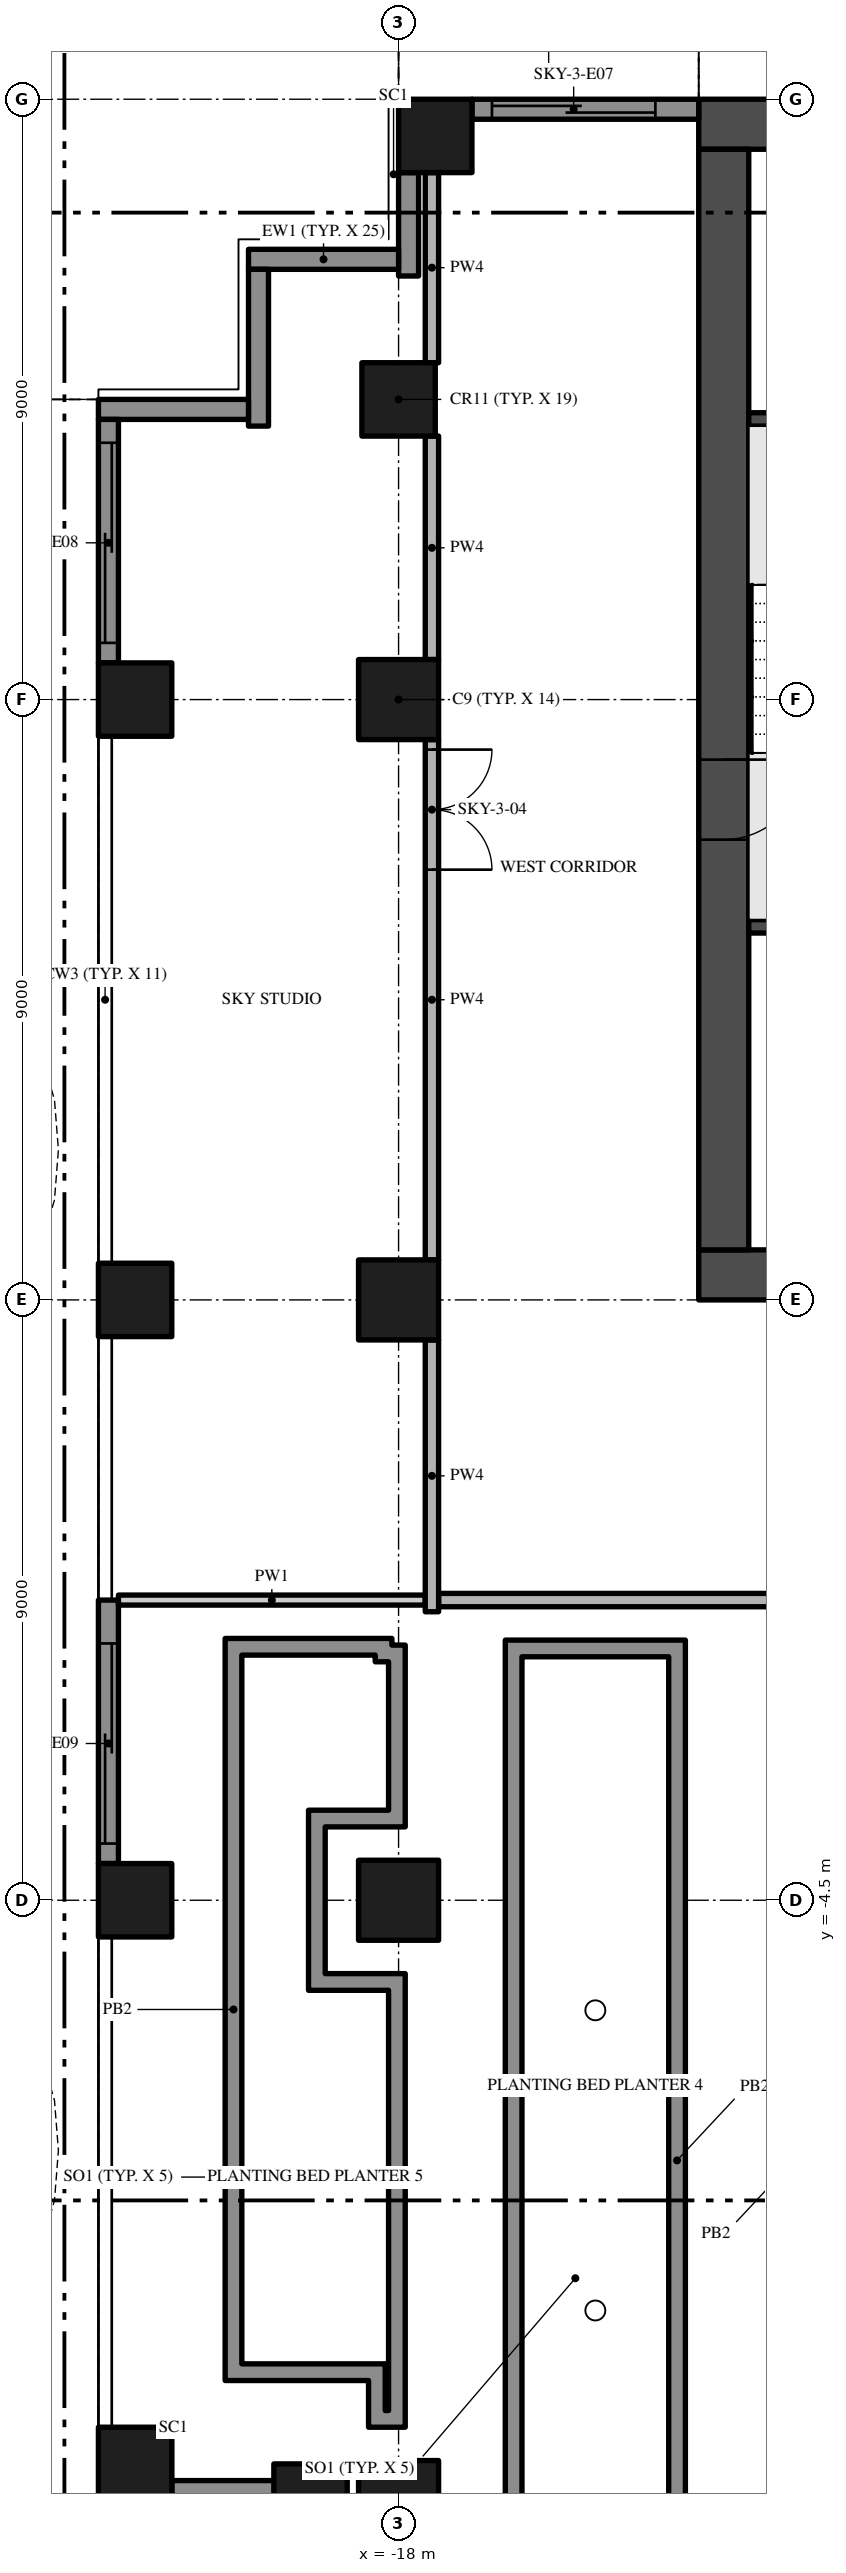
"""IFC4 building model, lengths in metres.
Left out: names, types, materials, properties, quantities, classifications, styles, units other than length and angle.
Written with IfcOpenShell. Run it as: python <this file> out.ifc"""

import sys

from ifc_helpers import new_model, si_unit, direction, frame, frame_2d, origin, origin_2d, place, context, subcontext, project, spatial, polyline, rectangle, outline, extrude, element, fill, save


model = new_model("IFC4")
c1 = context("Model", 3, precision=1e-05, world=origin(), true_north=direction((0.0, 1.0)))
c2 = subcontext(c1, "Body", "Model", "MODEL_VIEW")
j1 = project(units=[si_unit("LENGTHUNIT", "METRE"), si_unit("PLANEANGLEUNIT", "RADIAN")], contexts=[c1])
p1 = place(None, origin())
s1 = spatial("IfcSite", under=j1, at=p1, CompositionType="ELEMENT")
p2 = place(p1, origin())
s2 = spatial("IfcBuilding", under=s1, at=p2, CompositionType="ELEMENT")
p3 = place(p2, frame((0.0, 0.0, 174.4)))
s3 = spatial("IfcBuildingStorey", under=s2, at=p3, CompositionType="ELEMENT", Elevation=174.4)
p4 = place(p3, frame((-13.5, 4.875, -0.3), z_axis=(0.0, 0.0, 1.0), x_axis=(1.0, 0.0, 0.0)))
e1 = element("IfcWall", 1, at=p4, inside=s3, PredefinedType="SHEAR", context=c2, shape_type="SweptSolid", body=[
    extrude(rectangle(XDim=27.0, YDim=0.75, at=frame_2d((13.5, 0.0))), origin(), (0.0, 0.0, 1.0), 5.0),
])
p5 = place(p4, frame((12.0, 0.0, 0.3)))
e2 = element("IfcOpeningElement", 2, at=p5, cuts=e1, PredefinedType="OPENING", context=c2, shape_type="SweptSolid", body=[
    extrude(rectangle(XDim=3.0, YDim=2.4, at=frame_2d((1.5, 1.2))), frame((0.0, 0.385, 0.0), z_axis=(0.0, -1.0, 0.0), x_axis=(1.0, 0.0, 0.0)), (0.0, 0.0, 1.0), 0.77),
])
p6 = place(p4, frame((4.9, 0.0, 0.3)))
e3 = element("IfcOpeningElement", 3, at=p6, cuts=e1, PredefinedType="OPENING", context=c2, shape_type="SweptSolid", body=[
    extrude(rectangle(XDim=1.2, YDim=2.2, at=frame_2d((0.6, 1.1))), frame((0.0, 0.385, 0.0), z_axis=(0.0, -1.0, 0.0), x_axis=(1.0, 0.0, 0.0)), (0.0, 0.0, 1.0), 0.77),
])
p7 = place(p4, frame((20.75, 0.0, 0.3)))
e4 = element("IfcOpeningElement", 4, at=p7, cuts=e1, PredefinedType="OPENING", context=c2, shape_type="SweptSolid", body=[
    extrude(rectangle(XDim=1.5, YDim=2.2, at=frame_2d((0.75, 1.1))), frame((0.0, 0.385, 0.0), z_axis=(0.0, -1.0, 0.0), x_axis=(1.0, 0.0, 0.0)), (0.0, 0.0, 1.0), 0.77),
])
p8 = place(p4, frame((17.4, 0.0, 0.3)))
e5 = element("IfcOpeningElement", 5, at=p8, cuts=e1, PredefinedType="OPENING", context=c2, shape_type="SweptSolid", body=[
    extrude(rectangle(XDim=1.2, YDim=2.2, at=frame_2d((0.6, 1.1))), frame((0.0, 0.385, 0.0), z_axis=(0.0, -1.0, 0.0), x_axis=(1.0, 0.0, 0.0)), (0.0, 0.0, 1.0), 0.77),
])
p9 = place(p3, frame((13.5, 22.125, -0.3), z_axis=(0.0, 0.0, 1.0), x_axis=(-1.0, 0.0, 0.0)))
e6 = element("IfcWall", 6, at=p9, inside=s3, PredefinedType="SHEAR", context=c2, shape_type="SweptSolid", body=[
    extrude(rectangle(XDim=27.0, YDim=0.75, at=frame_2d((13.5, 0.0))), origin(), (0.0, 0.0, 1.0), 5.0),
])
p10 = place(p3, frame((-13.125, 21.75, -0.3), z_axis=(0.0, 0.0, 1.0), x_axis=(0.0, -1.0, 0.0)))
e7 = element("IfcWall", 7, at=p10, inside=s3, PredefinedType="SHEAR", context=c2, shape_type="SweptSolid", body=[
    extrude(rectangle(XDim=16.5, YDim=0.75, at=frame_2d((8.25, 0.0))), origin(), (0.0, 0.0, 1.0), 5.0),
])
p11 = place(p10, frame((9.15, 0.0, 0.3)))
e8 = element("IfcOpeningElement", 8, at=p11, cuts=e7, PredefinedType="OPENING", context=c2, shape_type="SweptSolid", body=[
    extrude(rectangle(XDim=1.2, YDim=2.2, at=frame_2d((0.6, 1.1))), frame((0.0, 0.385, 0.0), z_axis=(0.0, -1.0, 0.0), x_axis=(1.0, 0.0, 0.0)), (0.0, 0.0, 1.0), 0.77),
])
for number, where, z_axis, x_axis in (
    (9, (-18.0, -13.5, 0.0), (0.0, 0.0, 1.0), (1.0, 0.0, 0.0)),
    (10, (-18.0, -4.5, 0.0), (0.0, 0.0, 1.0), (1.0, 0.0, 0.0)),
    (11, (-18.0, 13.5, 0.0), (0.0, 0.0, 1.0), (1.0, 0.0, 0.0)),
):
    element("IfcColumn", number, at=place(p3, frame(where, z_axis=z_axis, x_axis=x_axis)), inside=s3, PredefinedType="COLUMN", context=c2, shape_type="SweptSolid", body=[
        extrude(rectangle(XDim=1.2, YDim=1.2, at=origin_2d()), origin(), (0.0, 0.0, 1.0), 4.7),
    ])
p12 = place(p3, frame((-17.45, 21.95, 0.0), z_axis=(0.0, 0.0, 1.0), x_axis=(1.0, 0.0, 0.0)))
e12 = element("IfcColumn", 12, at=p12, inside=s3, PredefinedType="COLUMN", context=c2, shape_type="SweptSolid", body=[
    extrude(rectangle(XDim=1.1, YDim=1.1, at=origin_2d()), origin(), (0.0, 0.0, 1.0), 4.7),
])
p13 = place(p3, frame((-18.0, 4.5, 0.0), z_axis=(0.0, 0.0, 1.0), x_axis=(1.0, 0.0, 0.0)))
e13 = element("IfcColumn", 13, at=p13, inside=s3, PredefinedType="COLUMN", context=c2, shape_type="SweptSolid", body=[
    extrude(rectangle(XDim=1.2, YDim=1.2, at=origin_2d()), origin(), (0.0, 0.0, 1.0), 4.7),
])
for number, where, z_axis, x_axis in (
    (14, (-21.95, -12.95, 0.0), (0.0, 0.0, 1.0), (1.0, 0.0, 0.0)),
    (15, (-19.32, -13.5, 0.0), (0.0, 0.0, 1.0), (1.0, 0.0, 0.0)),
    (16, (-21.95, -4.5, 0.0), (0.0, 0.0, 1.0), (1.0, 0.0, 0.0)),
    (17, (-21.95, 13.5, 0.0), (0.0, 0.0, 1.0), (1.0, 0.0, 0.0)),
    (18, (-18.0, 18.0, 0.0), (0.0, 0.0, 1.0), (1.0, 0.0, 0.0)),
    (19, (-21.95, 4.5, 0.0), (0.0, 0.0, 1.0), (1.0, 0.0, 0.0)),
):
    element("IfcColumn", number, at=place(p3, frame(where, z_axis=z_axis, x_axis=x_axis)), inside=s3, PredefinedType="COLUMN", context=c2, shape_type="SweptSolid", body=[
        extrude(rectangle(XDim=1.1, YDim=1.1, at=origin_2d()), origin(), (0.0, 0.0, 1.0), 4.7),
    ])
p14 = place(p3, frame((-16.9, 22.35, 0.0), z_axis=(0.0, 0.0, 1.0), x_axis=(1.0, 0.0, 0.0)))
e20 = element("IfcWall", 20, at=p14, inside=s3, PredefinedType="SOLIDWALL", context=c2, shape_type="SweptSolid", body=[
    extrude(rectangle(XDim=3.4, YDim=0.3, at=frame_2d((1.7, 0.0))), origin(), (0.0, 0.0, 1.0), 4.7),
])
p15 = place(p14, frame((0.3, 0.0, 0.0)))
e21 = element("IfcOpeningElement", 21, at=p15, cuts=e20, PredefinedType="OPENING", context=c2, shape_type="SweptSolid", body=[
    extrude(rectangle(XDim=2.45, YDim=2.4, at=frame_2d((1.225, 1.2))), frame((0.0, 0.16, 0.0), z_axis=(0.0, -1.0, 0.0), x_axis=(1.0, 0.0, 0.0)), (0.0, 0.0, 1.0), 0.32),
])
p16 = place(p3, frame((-17.85, 19.85, 0.0), z_axis=(0.0, 0.0, 1.0), x_axis=(0.0, 1.0, 0.0)))
e22 = element("IfcWall", 22, at=p16, inside=s3, PredefinedType="SOLIDWALL", context=c2, shape_type="SweptSolid", body=[
    extrude(rectangle(XDim=1.55, YDim=0.3, at=frame_2d((0.775, 0.0))), origin(), (0.0, 0.0, 1.0), 4.7),
])
p17 = place(p3, frame((-20.25, 20.1, 0.0), z_axis=(0.0, 0.0, 1.0), x_axis=(1.0, 0.0, 0.0)))
e23 = element("IfcWall", 23, at=p17, inside=s3, PredefinedType="SOLIDWALL", context=c2, shape_type="SweptSolid", body=[
    extrude(rectangle(XDim=2.25, YDim=0.3, at=frame_2d((1.125, 0.0))), origin(), (0.0, 0.0, 1.0), 4.7),
])
p18 = place(p3, frame((-20.1, 17.6, 0.0), z_axis=(0.0, 0.0, 1.0), x_axis=(0.0, 1.0, 0.0)))
e24 = element("IfcWall", 24, at=p18, inside=s3, PredefinedType="SOLIDWALL", context=c2, shape_type="SweptSolid", body=[
    extrude(rectangle(XDim=2.35, YDim=0.3, at=frame_2d((1.175, 0.0))), origin(), (0.0, 0.0, 1.0), 4.7),
])
p19 = place(p3, frame((-22.5, 17.85, 0.0), z_axis=(0.0, 0.0, 1.0), x_axis=(1.0, 0.0, 0.0)))
e25 = element("IfcWall", 25, at=p19, inside=s3, PredefinedType="SOLIDWALL", context=c2, shape_type="SweptSolid", body=[
    extrude(rectangle(XDim=2.25, YDim=0.3, at=frame_2d((1.125, 0.0))), origin(), (0.0, 0.0, 1.0), 4.7),
])
p20 = place(p3, frame((-22.35, 14.05, 0.0), z_axis=(0.0, 0.0, 1.0), x_axis=(0.0, 1.0, 0.0)))
e26 = element("IfcWall", 26, at=p20, inside=s3, PredefinedType="SOLIDWALL", context=c2, shape_type="SweptSolid", body=[
    extrude(rectangle(XDim=3.65, YDim=0.3, at=frame_2d((1.825, 0.0))), origin(), (0.0, 0.0, 1.0), 4.7),
])
p21 = place(p20, frame((0.3, 0.0, 0.0)))
e27 = element("IfcOpeningElement", 27, at=p21, cuts=e26, PredefinedType="OPENING", context=c2, shape_type="SweptSolid", body=[
    extrude(rectangle(XDim=3.0, YDim=2.4, at=frame_2d((1.5, 1.2))), frame((0.0, 0.16, 0.0), z_axis=(0.0, -1.0, 0.0), x_axis=(1.0, 0.0, 0.0)), (0.0, 0.0, 1.0), 0.32),
])
p22 = place(p3, frame((-22.35, -3.95, 0.0), z_axis=(0.0, 0.0, 1.0), x_axis=(0.0, 1.0, 0.0)))
e28 = element("IfcWall", 28, at=p22, inside=s3, PredefinedType="SOLIDWALL", context=c2, shape_type="SweptSolid", body=[
    extrude(rectangle(XDim=3.95, YDim=0.3, at=frame_2d((1.975, 0.0))), origin(), (0.0, 0.0, 1.0), 4.7),
])
p23 = place(p22, frame((0.3, 0.0, 0.0)))
e29 = element("IfcOpeningElement", 29, at=p23, cuts=e28, PredefinedType="OPENING", context=c2, shape_type="SweptSolid", body=[
    extrude(rectangle(XDim=3.0, YDim=2.4, at=frame_2d((1.5, 1.2))), frame((0.0, 0.16, 0.0), z_axis=(0.0, -1.0, 0.0), x_axis=(1.0, 0.0, 0.0)), (0.0, 0.0, 1.0), 0.32),
])
p24 = place(p3, frame((-19.85, -13.35, 0.0), z_axis=(0.0, 0.0, 1.0), x_axis=(-1.0, 0.0, 0.0)))
e30 = element("IfcWall", 30, at=p24, inside=s3, PredefinedType="SOLIDWALL", context=c2, shape_type="SweptSolid", body=[
    extrude(rectangle(XDim=1.55, YDim=0.3, at=frame_2d((0.775, 0.0))), origin(), (0.0, 0.0, 1.0), 4.7),
])
p25 = place(p3, origin())
e31 = element("IfcWall", 31, at=p25, inside=s3, PredefinedType="USERDEFINED", context=c2, shape_type="SweptSolid", body=[
    extrude(outline(polyline([(-24.3, 18.0), (-25.005, 16.5), (-25.441, 15.0), (-25.5, 14.25), (-25.441, 13.5), (-25.005, 12.0), (-24.3, 10.5), (-23.595, 9.0), (-23.159, 7.5), (-23.1, 6.75), (-23.159, 6.0), (-23.595, 4.5), (-24.3, 3.0), (-25.005, 1.5), (-25.441, 0.0), (-25.5, -0.75), (-25.441, -1.5), (-25.005, -3.0), (-24.3, -4.5), (-23.595, -6.0), (-23.159, -7.5), (-23.1, -8.25), (-23.159, -9.0), (-23.595, -10.5), (-24.3, -12.0), (-25.005, -13.5), (-24.779, -13.606), (-24.074, -12.106), (-23.36, -10.589), (-22.911, -9.045), (-22.849, -8.25), (-22.911, -7.455), (-23.36, -5.911), (-24.074, -4.394), (-24.771, -2.911), (-25.194, -1.455), (-25.249, -0.75), (-25.194, -0.045), (-24.771, 1.411), (-24.074, 2.894), (-23.36, 4.411), (-22.911, 5.955), (-22.849, 6.75), (-22.911, 7.545), (-23.36, 9.089), (-24.074, 10.606), (-24.771, 12.089), (-25.194, 13.545), (-25.249, 14.25), (-25.194, 14.955), (-24.771, 16.411), (-24.074, 17.894), (-24.3, 18.0)])), origin(), (0.0, 0.0, 1.0), 0.9),
])
for number, where, z_axis, x_axis in (
    (32, (-12.75, 10.1, 0.0), (0.0, 0.0, 1.0), (1.0, 0.0, 0.0)),
    (33, (-12.75, 17.7, 0.0), (0.0, 0.0, 1.0), (1.0, 0.0, 0.0)),
):
    element("IfcWall", number, at=place(p3, frame(where, z_axis=z_axis, x_axis=x_axis)), inside=s3, PredefinedType="SHEAR", context=c2, shape_type="SweptSolid", body=[
        extrude(rectangle(XDim=3.1, YDim=0.2, at=frame_2d((1.55, 0.0))), origin(), (0.0, 0.0, 1.0), 4.7),
    ])
p26 = place(p3, frame((-17.4, 0.0, 0.0), z_axis=(0.0, 0.0, 1.0), x_axis=(1.0, 0.0, 0.0)))
e34 = element("IfcWall", 34, at=p26, inside=s3, PredefinedType="PARTITIONING", context=c2, shape_type="SweptSolid", body=[
    extrude(rectangle(XDim=34.8, YDim=0.2, at=frame_2d((17.4, 0.0))), origin(), (0.0, 0.0, 1.0), 4.7),
])
p27 = place(p26, frame((7.65, 0.0, 0.0)))
e35 = element("IfcOpeningElement", 35, at=p27, cuts=e34, PredefinedType="OPENING", context=c2, shape_type="SweptSolid", body=[
    extrude(rectangle(XDim=2.0, YDim=2.4, at=frame_2d((1.0, 1.2))), frame((0.0, 0.11, 0.0), z_axis=(0.0, -1.0, 0.0), x_axis=(1.0, 0.0, 0.0)), (0.0, 0.0, 1.0), 0.22),
])
p28 = place(p26, frame((20.9, 0.0, 0.0)))
e36 = element("IfcOpeningElement", 36, at=p28, cuts=e34, PredefinedType="OPENING", context=c2, shape_type="SweptSolid", body=[
    extrude(rectangle(XDim=2.0, YDim=2.4, at=frame_2d((1.0, 1.2))), frame((0.0, 0.11, 0.0), z_axis=(0.0, -1.0, 0.0), x_axis=(1.0, 0.0, 0.0)), (0.0, 0.0, 1.0), 0.22),
])
p29 = place(p26, frame((29.65, 0.0, 0.0)))
e37 = element("IfcOpeningElement", 37, at=p29, cuts=e34, PredefinedType="OPENING", context=c2, shape_type="SweptSolid", body=[
    extrude(rectangle(XDim=2.0, YDim=2.4, at=frame_2d((1.0, 1.2))), frame((0.0, 0.11, 0.0), z_axis=(0.0, -1.0, 0.0), x_axis=(1.0, 0.0, 0.0)), (0.0, 0.0, 1.0), 0.22),
])
p30 = place(p3, frame((-22.2, 0.0, 0.0), z_axis=(0.0, 0.0, 1.0), x_axis=(1.0, 0.0, 0.0)))
e38 = element("IfcWall", 38, at=p30, inside=s3, PredefinedType="PARTITIONING", context=c2, shape_type="SweptSolid", body=[
    extrude(rectangle(XDim=4.6, YDim=0.15, at=frame_2d((2.3, 0.0))), origin(), (0.0, 0.0, 1.0), 4.7),
])
p31 = place(p3, frame((-17.5, -0.175, 0.0), z_axis=(0.0, 0.0, 1.0), x_axis=(0.0, 1.0, 0.0)))
e39 = element("IfcWall", 39, at=p31, inside=s3, PredefinedType="PARTITIONING", context=c2, shape_type="SweptSolid", body=[
    extrude(rectangle(XDim=4.075, YDim=0.2, at=frame_2d((2.038, 0.0))), origin(), (0.0, 0.0, 1.0), 4.7),
])
p32 = place(p3, frame((-17.5, 12.9, 0.0), z_axis=(0.0, 0.0, 1.0), x_axis=(0.0, -1.0, 0.0)))
e40 = element("IfcWall", 40, at=p32, inside=s3, PredefinedType="PARTITIONING", context=c2, shape_type="SweptSolid", body=[
    extrude(rectangle(XDim=7.8, YDim=0.2, at=frame_2d((3.9, 0.0))), origin(), (0.0, 0.0, 1.0), 4.7),
])
p33 = place(p32, frame((0.15, 0.0, 0.0)))
e41 = element("IfcOpeningElement", 41, at=p33, cuts=e40, PredefinedType="OPENING", context=c2, shape_type="SweptSolid", body=[
    extrude(rectangle(XDim=1.8, YDim=2.4, at=frame_2d((0.9, 1.2))), frame((0.0, 0.11, 0.0), z_axis=(0.0, -1.0, 0.0), x_axis=(1.0, 0.0, 0.0)), (0.0, 0.0, 1.0), 0.22),
])
p34 = place(p3, frame((-17.5, 14.1, 0.0), z_axis=(0.0, 0.0, 1.0), x_axis=(0.0, 1.0, 0.0)))
e42 = element("IfcWall", 42, at=p34, inside=s3, PredefinedType="PARTITIONING", context=c2, shape_type="SweptSolid", body=[
    extrude(rectangle(XDim=3.35, YDim=0.2, at=frame_2d((1.675, 0.0))), origin(), (0.0, 0.0, 1.0), 4.7),
])
p35 = place(p3, frame((-17.5, 18.55, 0.0), z_axis=(0.0, 0.0, 1.0), x_axis=(0.0, 1.0, 0.0)))
e43 = element("IfcWall", 43, at=p35, inside=s3, PredefinedType="PARTITIONING", context=c2, shape_type="SweptSolid", body=[
    extrude(rectangle(XDim=2.85, YDim=0.2, at=frame_2d((1.425, 0.0))), origin(), (0.0, 0.0, 1.0), 4.7),
])
p36 = place(p3, origin())
e44 = element("IfcWall", 44, at=p36, inside=s3, PredefinedType="USERDEFINED", context=c2, shape_type="SweptSolid", body=[
    extrude(outline(polyline([(-13.7, -16.2), (-13.7, -0.6), (-16.4, -0.6), (-16.4, -13.95), (-16.2, -13.95), (-16.2, -16.2), (-13.7, -16.2)]), holes=[polyline([(-15.95, -15.95), (-15.95, -13.7), (-16.15, -13.7), (-16.15, -0.85), (-13.95, -0.85), (-13.95, -15.95), (-15.95, -15.95)])]), origin(), (0.0, 0.0, 1.0), 0.9),
])
p37 = place(p3, origin())
e45 = element("IfcWall", 45, at=p37, inside=s3, PredefinedType="USERDEFINED", context=c2, shape_type="SweptSolid", body=[
    extrude(outline(polyline([(-17.9, -12.4), (-17.9, -5.6), (-19.1, -5.6), (-19.1, -3.4), (-17.9, -3.4), (-17.9, -0.675), (-18.1, -0.675), (-18.1, -0.575), (-20.6, -0.575), (-20.6, -11.7), (-18.45, -11.7), (-18.45, -12.4), (-17.9, -12.4)]), holes=[polyline([(-18.2, -12.15), (-18.2, -11.45), (-20.35, -11.45), (-20.35, -0.825), (-18.35, -0.825), (-18.35, -0.925), (-18.15, -0.925), (-18.15, -3.15), (-19.35, -3.15), (-19.35, -5.85), (-18.15, -5.85), (-18.15, -12.15), (-18.2, -12.15)])]), origin(), (0.0, 0.0, 1.0), 0.9),
])
p38 = place(p15, origin())
e46 = element("IfcDoor", 46, at=p38, inside=s3, OperationType="SINGLE_SWING_LEFT", PredefinedType="DOOR", context=c2, shape_type="SweptSolid", body=[
    extrude(rectangle(XDim=2.45, YDim=2.4, at=frame_2d((1.225, 1.2))), frame((0.0, 0.025, 0.0), z_axis=(0.0, -1.0, 0.0), x_axis=(1.0, 0.0, 0.0)), (0.0, 0.0, 1.0), 0.05),
])
fill(e21, e46)
p39 = place(p21, origin())
e47 = element("IfcDoor", 47, at=p39, inside=s3, OperationType="SINGLE_SWING_LEFT", PredefinedType="DOOR", context=c2, shape_type="SweptSolid", body=[
    extrude(rectangle(XDim=3.0, YDim=2.4, at=frame_2d((1.5, 1.2))), frame((0.0, 0.025, 0.0), z_axis=(0.0, -1.0, 0.0), x_axis=(1.0, 0.0, 0.0)), (0.0, 0.0, 1.0), 0.05),
])
fill(e27, e47)
p40 = place(p23, origin())
e48 = element("IfcDoor", 48, at=p40, inside=s3, OperationType="SINGLE_SWING_LEFT", PredefinedType="DOOR", context=c2, shape_type="SweptSolid", body=[
    extrude(rectangle(XDim=3.0, YDim=2.4, at=frame_2d((1.5, 1.2))), frame((0.0, 0.025, 0.0), z_axis=(0.0, -1.0, 0.0), x_axis=(1.0, 0.0, 0.0)), (0.0, 0.0, 1.0), 0.05),
])
fill(e29, e48)
p41 = place(p11, frame((1.2, 0.0, 0.0), z_axis=(0.0, 0.0, 1.0), x_axis=(-1.0, 0.0, 0.0)))
e49 = element("IfcDoor", 49, at=p41, inside=s3, OperationType="SINGLE_SWING_RIGHT", PredefinedType="DOOR", context=c2, shape_type="SweptSolid", body=[
    extrude(rectangle(XDim=1.2, YDim=2.2, at=frame_2d((0.6, 1.1))), frame((0.0, 0.025, 0.0), z_axis=(0.0, -1.0, 0.0), x_axis=(1.0, 0.0, 0.0)), (0.0, 0.0, 1.0), 0.05),
])
fill(e8, e49)
p42 = place(p33, origin())
e50 = element("IfcDoor", 50, at=p42, inside=s3, OperationType="DOUBLE_DOOR_SINGLE_SWING", PredefinedType="DOOR", context=c2, shape_type="SweptSolid", body=[
    extrude(rectangle(XDim=1.8, YDim=2.4, at=frame_2d((0.9, 1.2))), frame((0.0, 0.025, 0.0), z_axis=(0.0, -1.0, 0.0), x_axis=(1.0, 0.0, 0.0)), (0.0, 0.0, 1.0), 0.05),
])
fill(e41, e50)
save(model, sys.argv[1])
